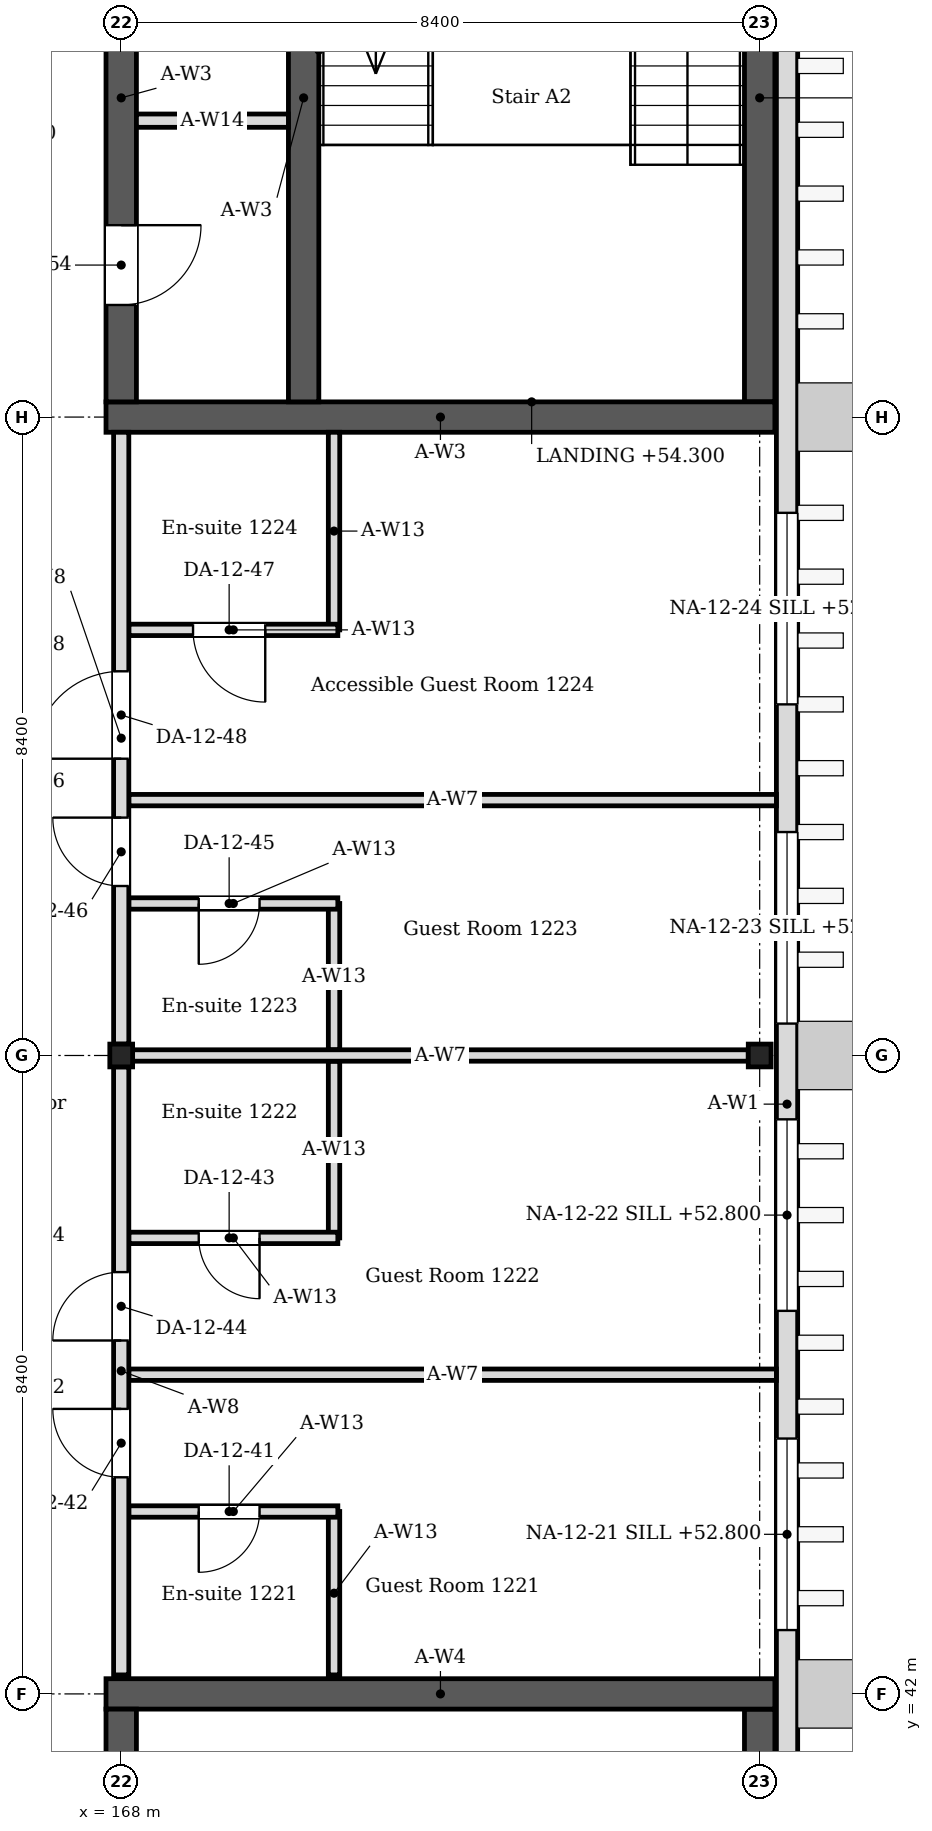
"""IFC4 building model, lengths in metres.
Left out: names, types, materials, properties, quantities, classifications, styles, units other than length and angle.
Written with IfcOpenShell. Run it as: python <this file> out.ifc"""

import sys

from ifc_helpers import new_model, si_unit, direction, frame, frame_2d, origin, origin_2d, place, context, subcontext, project, spatial, rectangle, i_section, extrude, element, fill, save


model = new_model("IFC4")
c1 = context("Model", 3, precision=1e-05, world=origin(), true_north=direction((0.0, 1.0)))
c2 = subcontext(c1, "Body", "Model", "MODEL_VIEW")
j1 = project(units=[si_unit("LENGTHUNIT", "METRE"), si_unit("PLANEANGLEUNIT", "RADIAN")], contexts=[c1])
p1 = place(None, origin())
s1 = spatial("IfcSite", under=j1, at=p1, CompositionType="ELEMENT")
p2 = place(p1, origin())
s2 = spatial("IfcBuilding", under=s1, at=p2, CompositionType="ELEMENT")
p3 = place(p2, frame((0.0, 0.0, 52.2)))
s3 = spatial("IfcBuildingStorey", under=s2, at=p3, CompositionType="ELEMENT", Elevation=52.2)
for number, where, z_axis, x_axis in (
    (1, (168.0, 50.4, 0.0), (0.0, 0.0, 1.0), (1.0, 0.0, 0.0)),
    (2, (176.4, 50.4, 0.0), (0.0, 0.0, 1.0), (1.0, 0.0, 0.0)),
):
    element("IfcColumn", number, at=place(p3, frame(where, z_axis=z_axis, x_axis=x_axis)), inside=s3, PredefinedType="COLUMN", context=c2, shape_type="SweptSolid", body=[
        extrude(i_section(OverallWidth=0.3, OverallDepth=0.3, WebThickness=0.01, FlangeThickness=0.015, FilletRadius=0.013, at=origin_2d()), origin(), (0.0, 0.0, 1.0), 4.2),
    ])
p4 = place(p3, frame((167.8, 58.8, 0.0), z_axis=(0.0, 0.0, 1.0), x_axis=(1.0, 0.0, 0.0)))
e3 = element("IfcWall", 3, at=p4, inside=s3, PredefinedType="SOLIDWALL", context=c2, shape_type="SweptSolid", body=[
    extrude(rectangle(XDim=8.8, YDim=0.4, at=frame_2d((4.4, 0.0))), origin(), (0.0, 0.0, 1.0), 4.05),
])
p5 = place(p3, frame((168.0, 59.0, 0.0), z_axis=(0.0, 0.0, 1.0), x_axis=(0.0, 1.0, 0.0)))
e4 = element("IfcWall", 4, at=p5, inside=s3, PredefinedType="SOLIDWALL", context=c2, shape_type="SweptSolid", body=[
    extrude(rectangle(XDim=8.0, YDim=0.4, at=frame_2d((4.0, 0.0))), origin(), (0.0, 0.0, 1.0), 4.05),
])
p6 = place(p5, frame((5.25, 0.0, 0.0)))
e5 = element("IfcOpeningElement", 5, at=p6, cuts=e4, PredefinedType="OPENING", context=c2, shape_type="SweptSolid", body=[
    extrude(rectangle(XDim=1.0, YDim=2.1, at=frame_2d((0.5, 1.05))), frame((0.0, 0.21, 0.0), z_axis=(0.0, -1.0, 0.0), x_axis=(1.0, 0.0, 0.0)), (0.0, 0.0, 1.0), 0.42),
])
p7 = place(p5, frame((1.275, 0.0, 0.0)))
e6 = element("IfcOpeningElement", 6, at=p7, cuts=e4, PredefinedType="OPENING", context=c2, shape_type="SweptSolid", body=[
    extrude(rectangle(XDim=1.05, YDim=2.1, at=frame_2d((0.525, 1.05))), frame((0.0, 0.21, 0.0), z_axis=(0.0, -1.0, 0.0), x_axis=(1.0, 0.0, 0.0)), (0.0, 0.0, 1.0), 0.42),
])
p8 = place(p3, frame((176.4, 59.0, 0.0), z_axis=(0.0, 0.0, 1.0), x_axis=(0.0, 1.0, 0.0)))
e7 = element("IfcWall", 7, at=p8, inside=s3, PredefinedType="SOLIDWALL", context=c2, shape_type="SweptSolid", body=[
    extrude(rectangle(XDim=8.0, YDim=0.4, at=frame_2d((4.0, 0.0))), origin(), (0.0, 0.0, 1.0), 4.05),
])
p9 = place(p3, frame((167.8, 42.0, 0.0), z_axis=(0.0, 0.0, 1.0), x_axis=(1.0, 0.0, 0.0)))
e8 = element("IfcWall", 8, at=p9, inside=s3, PredefinedType="SOLIDWALL", context=c2, shape_type="SweptSolid", body=[
    extrude(rectangle(XDim=8.8, YDim=0.4, at=frame_2d((4.4, 0.0))), origin(), (0.0, 0.0, 1.0), 4.05),
])
p10 = place(p3, frame((168.0, 25.4, 0.0), z_axis=(0.0, 0.0, 1.0), x_axis=(0.0, 1.0, 0.0)))
e9 = element("IfcWall", 9, at=p10, inside=s3, PredefinedType="SOLIDWALL", context=c2, shape_type="SweptSolid", body=[
    extrude(rectangle(XDim=16.4, YDim=0.4, at=frame_2d((8.2, 0.0))), origin(), (0.0, 0.0, 1.0), 4.05),
])
p11 = place(p10, frame((1.0, 0.0, 0.0)))
e10 = element("IfcOpeningElement", 10, at=p11, cuts=e9, PredefinedType="OPENING", context=c2, shape_type="SweptSolid", body=[
    extrude(rectangle(XDim=1.0, YDim=2.1, at=frame_2d((0.5, 1.05))), frame((0.0, 0.21, 0.0), z_axis=(0.0, -1.0, 0.0), x_axis=(1.0, 0.0, 0.0)), (0.0, 0.0, 1.0), 0.42),
])
p12 = place(p10, frame((14.4, 0.0, 0.0)))
e11 = element("IfcOpeningElement", 11, at=p12, cuts=e9, PredefinedType="OPENING", context=c2, shape_type="SweptSolid", body=[
    extrude(rectangle(XDim=1.4, YDim=2.1, at=frame_2d((0.7, 1.05))), frame((0.0, 0.21, 0.0), z_axis=(0.0, -1.0, 0.0), x_axis=(1.0, 0.0, 0.0)), (0.0, 0.0, 1.0), 0.42),
])
p13 = place(p3, frame((176.4, 25.4, 0.0), z_axis=(0.0, 0.0, 1.0), x_axis=(0.0, 1.0, 0.0)))
e12 = element("IfcWall", 12, at=p13, inside=s3, PredefinedType="SOLIDWALL", context=c2, shape_type="SweptSolid", body=[
    extrude(rectangle(XDim=16.4, YDim=0.4, at=frame_2d((8.2, 0.0))), origin(), (0.0, 0.0, 1.0), 4.05),
])
p14 = place(p3, frame((176.76, 24.85, 0.0), z_axis=(0.0, 0.0, 1.0), x_axis=(0.0, 1.0, 0.0)))
e13 = element("IfcWall", 13, at=p14, inside=s3, PredefinedType="SOLIDWALL", context=c2, shape_type="SweptSolid", body=[
    extrude(rectangle(XDim=42.57, YDim=0.28, at=frame_2d((21.285, 0.0))), origin(), (0.0, 0.0, 1.0), 4.05),
])
p15 = place(p14, frame((17.99, 0.0, 0.6)))
e14 = element("IfcOpeningElement", 14, at=p15, cuts=e13, PredefinedType="OPENING", context=c2, shape_type="SweptSolid", body=[
    extrude(rectangle(XDim=2.52, YDim=2.4, at=frame_2d((1.26, 1.2))), frame((0.0, 0.15, 0.0), z_axis=(0.0, -1.0, 0.0), x_axis=(1.0, 0.0, 0.0)), (0.0, 0.0, 1.0), 0.3),
])
p16 = place(p14, frame((22.19, 0.0, 0.6)))
e15 = element("IfcOpeningElement", 15, at=p16, cuts=e13, PredefinedType="OPENING", context=c2, shape_type="SweptSolid", body=[
    extrude(rectangle(XDim=2.52, YDim=2.4, at=frame_2d((1.26, 1.2))), frame((0.0, 0.15, 0.0), z_axis=(0.0, -1.0, 0.0), x_axis=(1.0, 0.0, 0.0)), (0.0, 0.0, 1.0), 0.3),
])
p17 = place(p14, frame((25.97, 0.0, 0.6)))
e16 = element("IfcOpeningElement", 16, at=p17, cuts=e13, PredefinedType="OPENING", context=c2, shape_type="SweptSolid", body=[
    extrude(rectangle(XDim=2.52, YDim=2.4, at=frame_2d((1.26, 1.2))), frame((0.0, 0.15, 0.0), z_axis=(0.0, -1.0, 0.0), x_axis=(1.0, 0.0, 0.0)), (0.0, 0.0, 1.0), 0.3),
])
p18 = place(p14, frame((30.17, 0.0, 0.45)))
e17 = element("IfcOpeningElement", 17, at=p18, cuts=e13, PredefinedType="OPENING", context=c2, shape_type="SweptSolid", body=[
    extrude(rectangle(XDim=2.52, YDim=2.1, at=frame_2d((1.26, 1.05))), frame((0.0, 0.15, 0.0), z_axis=(0.0, -1.0, 0.0), x_axis=(1.0, 0.0, 0.0)), (0.0, 0.0, 1.0), 0.3),
])
p19 = place(p3, frame((170.8, 42.25, 0.0), z_axis=(0.0, 0.0, 1.0), x_axis=(0.0, 1.0, 0.0)))
e18 = element("IfcWall", 18, at=p19, inside=s3, PredefinedType="PARTITIONING", context=c2, shape_type="SweptSolid", body=[
    extrude(rectangle(XDim=2.15, YDim=0.15, at=frame_2d((1.075, 0.0))), origin(), (0.0, 0.0, 1.0), 4.05),
])
p20 = place(p3, frame((170.85, 44.4, 0.0), z_axis=(0.0, 0.0, 1.0), x_axis=(-1.0, 0.0, 0.0)))
e19 = element("IfcWall", 19, at=p20, inside=s3, PredefinedType="PARTITIONING", context=c2, shape_type="SweptSolid", body=[
    extrude(rectangle(XDim=2.75, YDim=0.15, at=frame_2d((1.375, 0.0))), origin(), (0.0, 0.0, 1.0), 4.05),
])
p21 = place(p20, frame((1.03, 0.0, 0.0)))
e20 = element("IfcOpeningElement", 20, at=p21, cuts=e19, PredefinedType="OPENING", context=c2, shape_type="SweptSolid", body=[
    extrude(rectangle(XDim=0.8, YDim=2.1, at=frame_2d((0.4, 1.05))), frame((0.0, 0.085, 0.0), z_axis=(0.0, -1.0, 0.0), x_axis=(1.0, 0.0, 0.0)), (0.0, 0.0, 1.0), 0.17),
])
p22 = place(p3, frame((170.8, 48.0, 0.0), z_axis=(0.0, 0.0, 1.0), x_axis=(0.0, 1.0, 0.0)))
e21 = element("IfcWall", 21, at=p22, inside=s3, PredefinedType="PARTITIONING", context=c2, shape_type="SweptSolid", body=[
    extrude(rectangle(XDim=2.325, YDim=0.15, at=frame_2d((1.163, 0.0))), origin(), (0.0, 0.0, 1.0), 4.05),
])
p23 = place(p3, frame((170.85, 48.0, 0.0), z_axis=(0.0, 0.0, 1.0), x_axis=(-1.0, 0.0, 0.0)))
e22 = element("IfcWall", 22, at=p23, inside=s3, PredefinedType="PARTITIONING", context=c2, shape_type="SweptSolid", body=[
    extrude(rectangle(XDim=2.75, YDim=0.15, at=frame_2d((1.375, 0.0))), origin(), (0.0, 0.0, 1.0), 4.05),
])
p24 = place(p23, frame((1.03, 0.0, 0.0)))
e23 = element("IfcOpeningElement", 23, at=p24, cuts=e22, PredefinedType="OPENING", context=c2, shape_type="SweptSolid", body=[
    extrude(rectangle(XDim=0.8, YDim=2.1, at=frame_2d((0.4, 1.05))), frame((0.0, 0.085, 0.0), z_axis=(0.0, -1.0, 0.0), x_axis=(1.0, 0.0, 0.0)), (0.0, 0.0, 1.0), 0.17),
])
p25 = place(p3, frame((170.8, 50.475, 0.0), z_axis=(0.0, 0.0, 1.0), x_axis=(0.0, 1.0, 0.0)))
e24 = element("IfcWall", 24, at=p25, inside=s3, PredefinedType="PARTITIONING", context=c2, shape_type="SweptSolid", body=[
    extrude(rectangle(XDim=1.925, YDim=0.15, at=frame_2d((0.962, 0.0))), origin(), (0.0, 0.0, 1.0), 4.05),
])
p26 = place(p3, frame((170.85, 52.4, 0.0), z_axis=(0.0, 0.0, 1.0), x_axis=(-1.0, 0.0, 0.0)))
e25 = element("IfcWall", 25, at=p26, inside=s3, PredefinedType="PARTITIONING", context=c2, shape_type="SweptSolid", body=[
    extrude(rectangle(XDim=2.75, YDim=0.15, at=frame_2d((1.375, 0.0))), origin(), (0.0, 0.0, 1.0), 4.05),
])
p27 = place(p26, frame((1.03, 0.0, 0.0)))
e26 = element("IfcOpeningElement", 26, at=p27, cuts=e25, PredefinedType="OPENING", context=c2, shape_type="SweptSolid", body=[
    extrude(rectangle(XDim=0.8, YDim=2.1, at=frame_2d((0.4, 1.05))), frame((0.0, 0.085, 0.0), z_axis=(0.0, -1.0, 0.0), x_axis=(1.0, 0.0, 0.0)), (0.0, 0.0, 1.0), 0.17),
])
p28 = place(p3, frame((170.8, 56.0, 0.0), z_axis=(0.0, 0.0, 1.0), x_axis=(0.0, 1.0, 0.0)))
e27 = element("IfcWall", 27, at=p28, inside=s3, PredefinedType="PARTITIONING", context=c2, shape_type="SweptSolid", body=[
    extrude(rectangle(XDim=2.6, YDim=0.15, at=frame_2d((1.3, 0.0))), origin(), (0.0, 0.0, 1.0), 4.05),
])
p29 = place(p3, frame((170.85, 56.0, 0.0), z_axis=(0.0, 0.0, 1.0), x_axis=(-1.0, 0.0, 0.0)))
e28 = element("IfcWall", 28, at=p29, inside=s3, PredefinedType="PARTITIONING", context=c2, shape_type="SweptSolid", body=[
    extrude(rectangle(XDim=2.75, YDim=0.15, at=frame_2d((1.375, 0.0))), origin(), (0.0, 0.0, 1.0), 4.05),
])
p30 = place(p29, frame((0.955, 0.0, 0.0)))
e29 = element("IfcOpeningElement", 29, at=p30, cuts=e28, PredefinedType="OPENING", context=c2, shape_type="SweptSolid", body=[
    extrude(rectangle(XDim=0.95, YDim=2.1, at=frame_2d((0.475, 1.05))), frame((0.0, 0.085, 0.0), z_axis=(0.0, -1.0, 0.0), x_axis=(1.0, 0.0, 0.0)), (0.0, 0.0, 1.0), 0.17),
])
p31 = place(p3, frame((168.15, 50.4, 0.0), z_axis=(0.0, 0.0, 1.0), x_axis=(1.0, 0.0, 0.0)))
e30 = element("IfcWall", 30, at=p31, inside=s3, PredefinedType="PARTITIONING", context=c2, shape_type="SweptSolid", body=[
    extrude(rectangle(XDim=8.1, YDim=0.15, at=frame_2d((4.05, 0.0))), origin(), (0.0, 0.0, 1.0), 3.604),
])
for number, where, z_axis, x_axis in (
    (31, (168.1, 46.2, 0.0), (0.0, 0.0, 1.0), (1.0, 0.0, 0.0)),
    (32, (168.1, 53.76, 0.0), (0.0, 0.0, 1.0), (1.0, 0.0, 0.0)),
):
    element("IfcWall", number, at=place(p3, frame(where, z_axis=z_axis, x_axis=x_axis)), inside=s3, PredefinedType="PARTITIONING", context=c2, shape_type="SweptSolid", body=[
        extrude(rectangle(XDim=8.52, YDim=0.15, at=frame_2d((4.26, 0.0))), origin(), (0.0, 0.0, 1.0), 3.604),
    ])
p32 = place(p3, frame((168.0, 42.25, 0.0), z_axis=(0.0, 0.0, 1.0), x_axis=(0.0, 1.0, 0.0)))
e33 = element("IfcWall", 33, at=p32, inside=s3, PredefinedType="PARTITIONING", context=c2, shape_type="SweptSolid", body=[
    extrude(rectangle(XDim=8.0, YDim=0.2, at=frame_2d((4.0, 0.0))), origin(), (0.0, 0.0, 1.0), 3.45),
])
p33 = place(p32, frame((2.6, 0.0, 0.0)))
e34 = element("IfcOpeningElement", 34, at=p33, cuts=e33, PredefinedType="OPENING", context=c2, shape_type="SweptSolid", body=[
    extrude(rectangle(XDim=0.9, YDim=2.1, at=frame_2d((0.45, 1.05))), frame((0.0, 0.11, 0.0), z_axis=(0.0, -1.0, 0.0), x_axis=(1.0, 0.0, 0.0)), (0.0, 0.0, 1.0), 0.22),
])
p34 = place(p32, frame((4.4, 0.0, 0.0)))
e35 = element("IfcOpeningElement", 35, at=p34, cuts=e33, PredefinedType="OPENING", context=c2, shape_type="SweptSolid", body=[
    extrude(rectangle(XDim=0.9, YDim=2.1, at=frame_2d((0.45, 1.05))), frame((0.0, 0.11, 0.0), z_axis=(0.0, -1.0, 0.0), x_axis=(1.0, 0.0, 0.0)), (0.0, 0.0, 1.0), 0.22),
])
p35 = place(p3, frame((168.0, 50.55, 0.0), z_axis=(0.0, 0.0, 1.0), x_axis=(0.0, 1.0, 0.0)))
e36 = element("IfcWall", 36, at=p35, inside=s3, PredefinedType="PARTITIONING", context=c2, shape_type="SweptSolid", body=[
    extrude(rectangle(XDim=8.05, YDim=0.2, at=frame_2d((4.025, 0.0))), origin(), (0.0, 0.0, 1.0), 3.45),
])
p36 = place(p35, frame((2.08, 0.0, 0.0)))
e37 = element("IfcOpeningElement", 37, at=p36, cuts=e36, PredefinedType="OPENING", context=c2, shape_type="SweptSolid", body=[
    extrude(rectangle(XDim=0.9, YDim=2.1, at=frame_2d((0.45, 1.05))), frame((0.0, 0.11, 0.0), z_axis=(0.0, -1.0, 0.0), x_axis=(1.0, 0.0, 0.0)), (0.0, 0.0, 1.0), 0.22),
])
p37 = place(p35, frame((3.755, 0.0, 0.0)))
e38 = element("IfcOpeningElement", 38, at=p37, cuts=e36, PredefinedType="OPENING", context=c2, shape_type="SweptSolid", body=[
    extrude(rectangle(XDim=1.15, YDim=2.1, at=frame_2d((0.575, 1.05))), frame((0.0, 0.11, 0.0), z_axis=(0.0, -1.0, 0.0), x_axis=(1.0, 0.0, 0.0)), (0.0, 0.0, 1.0), 0.22),
])
p38 = place(p3, frame((170.4, 59.0, 0.0), z_axis=(0.0, 0.0, 1.0), x_axis=(0.0, 1.0, 0.0)))
e39 = element("IfcWall", 39, at=p38, inside=s3, PredefinedType="SOLIDWALL", context=c2, shape_type="SweptSolid", body=[
    extrude(rectangle(XDim=8.0, YDim=0.4, at=frame_2d((4.0, 0.0))), origin(), (0.0, 0.0, 1.0), 4.05),
])
p39 = place(p38, frame((6.8, 0.0, 0.0)))
e40 = element("IfcOpeningElement", 40, at=p39, cuts=e39, PredefinedType="OPENING", context=c2, shape_type="SweptSolid", body=[
    extrude(rectangle(XDim=0.9, YDim=2.1, at=frame_2d((0.45, 1.05))), frame((0.0, 0.21, 0.0), z_axis=(0.0, -1.0, 0.0), x_axis=(1.0, 0.0, 0.0)), (0.0, 0.0, 1.0), 0.42),
])
p40 = place(p3, frame((168.2, 62.7, 0.0), z_axis=(0.0, 0.0, 1.0), x_axis=(1.0, 0.0, 0.0)))
e41 = element("IfcWall", 41, at=p40, inside=s3, PredefinedType="PARTITIONING", context=c2, shape_type="SweptSolid", body=[
    extrude(rectangle(XDim=2.0, YDim=0.175, at=frame_2d((1.0, 0.0))), origin(), (0.0, 0.0, 1.0), 4.05),
])
p41 = place(p15, origin())
e42 = element("IfcWindow", 42, at=p41, inside=s3, PartitioningType="SINGLE_PANEL", PredefinedType="WINDOW", context=c2, shape_type="SweptSolid", body=[
    extrude(rectangle(XDim=2.52, YDim=2.4, at=frame_2d((1.26, 1.2))), frame((0.0, 0.03, 0.0), z_axis=(0.0, -1.0, 0.0), x_axis=(1.0, 0.0, 0.0)), (0.0, 0.0, 1.0), 0.06),
])
fill(e14, e42)
p42 = place(p16, origin())
e43 = element("IfcWindow", 43, at=p42, inside=s3, PartitioningType="SINGLE_PANEL", PredefinedType="WINDOW", context=c2, shape_type="SweptSolid", body=[
    extrude(rectangle(XDim=2.52, YDim=2.4, at=frame_2d((1.26, 1.2))), frame((0.0, 0.03, 0.0), z_axis=(0.0, -1.0, 0.0), x_axis=(1.0, 0.0, 0.0)), (0.0, 0.0, 1.0), 0.06),
])
fill(e15, e43)
p43 = place(p17, origin())
e44 = element("IfcWindow", 44, at=p43, inside=s3, PartitioningType="SINGLE_PANEL", PredefinedType="WINDOW", context=c2, shape_type="SweptSolid", body=[
    extrude(rectangle(XDim=2.52, YDim=2.4, at=frame_2d((1.26, 1.2))), frame((0.0, 0.03, 0.0), z_axis=(0.0, -1.0, 0.0), x_axis=(1.0, 0.0, 0.0)), (0.0, 0.0, 1.0), 0.06),
])
fill(e16, e44)
p44 = place(p18, origin())
e45 = element("IfcWindow", 45, at=p44, inside=s3, PartitioningType="SINGLE_PANEL", PredefinedType="WINDOW", context=c2, shape_type="SweptSolid", body=[
    extrude(rectangle(XDim=2.52, YDim=2.1, at=frame_2d((1.26, 1.05))), frame((0.0, 0.03, 0.0), z_axis=(0.0, -1.0, 0.0), x_axis=(1.0, 0.0, 0.0)), (0.0, 0.0, 1.0), 0.06),
])
fill(e17, e45)
p45 = place(p21, origin())
e46 = element("IfcDoor", 46, at=p45, inside=s3, OperationType="SINGLE_SWING_RIGHT", PredefinedType="DOOR", context=c2, shape_type="SweptSolid", body=[
    extrude(rectangle(XDim=0.8, YDim=2.1, at=frame_2d((0.4, 1.05))), frame((0.0, 0.025, 0.0), z_axis=(0.0, -1.0, 0.0), x_axis=(1.0, 0.0, 0.0)), (0.0, 0.0, 1.0), 0.05),
])
fill(e20, e46)
p46 = place(p33, origin())
e47 = element("IfcDoor", 47, at=p46, inside=s3, OperationType="SINGLE_SWING_RIGHT", PredefinedType="DOOR", context=c2, shape_type="SweptSolid", body=[
    extrude(rectangle(XDim=0.9, YDim=2.1, at=frame_2d((0.45, 1.05))), frame((0.0, 0.025, 0.0), z_axis=(0.0, -1.0, 0.0), x_axis=(1.0, 0.0, 0.0)), (0.0, 0.0, 1.0), 0.05),
])
fill(e34, e47)
p47 = place(p24, origin())
e48 = element("IfcDoor", 48, at=p47, inside=s3, OperationType="SINGLE_SWING_LEFT", PredefinedType="DOOR", context=c2, shape_type="SweptSolid", body=[
    extrude(rectangle(XDim=0.8, YDim=2.1, at=frame_2d((0.4, 1.05))), frame((0.0, 0.025, 0.0), z_axis=(0.0, -1.0, 0.0), x_axis=(1.0, 0.0, 0.0)), (0.0, 0.0, 1.0), 0.05),
])
fill(e23, e48)
p48 = place(p34, origin())
e49 = element("IfcDoor", 49, at=p48, inside=s3, OperationType="SINGLE_SWING_LEFT", PredefinedType="DOOR", context=c2, shape_type="SweptSolid", body=[
    extrude(rectangle(XDim=0.9, YDim=2.1, at=frame_2d((0.45, 1.05))), frame((0.0, 0.025, 0.0), z_axis=(0.0, -1.0, 0.0), x_axis=(1.0, 0.0, 0.0)), (0.0, 0.0, 1.0), 0.05),
])
fill(e35, e49)
p49 = place(p27, origin())
e50 = element("IfcDoor", 50, at=p49, inside=s3, OperationType="SINGLE_SWING_RIGHT", PredefinedType="DOOR", context=c2, shape_type="SweptSolid", body=[
    extrude(rectangle(XDim=0.8, YDim=2.1, at=frame_2d((0.4, 1.05))), frame((0.0, 0.025, 0.0), z_axis=(0.0, -1.0, 0.0), x_axis=(1.0, 0.0, 0.0)), (0.0, 0.0, 1.0), 0.05),
])
fill(e26, e50)
p50 = place(p36, origin())
e51 = element("IfcDoor", 51, at=p50, inside=s3, OperationType="SINGLE_SWING_RIGHT", PredefinedType="DOOR", context=c2, shape_type="SweptSolid", body=[
    extrude(rectangle(XDim=0.9, YDim=2.1, at=frame_2d((0.45, 1.05))), frame((0.0, 0.025, 0.0), z_axis=(0.0, -1.0, 0.0), x_axis=(1.0, 0.0, 0.0)), (0.0, 0.0, 1.0), 0.05),
])
fill(e37, e51)
p51 = place(p30, origin())
e52 = element("IfcDoor", 52, at=p51, inside=s3, OperationType="SINGLE_SWING_LEFT", PredefinedType="DOOR", context=c2, shape_type="SweptSolid", body=[
    extrude(rectangle(XDim=0.95, YDim=2.1, at=frame_2d((0.475, 1.05))), frame((0.0, 0.025, 0.0), z_axis=(0.0, -1.0, 0.0), x_axis=(1.0, 0.0, 0.0)), (0.0, 0.0, 1.0), 0.05),
])
fill(e29, e52)
p52 = place(p37, origin())
e53 = element("IfcDoor", 53, at=p52, inside=s3, OperationType="SINGLE_SWING_LEFT", PredefinedType="DOOR", context=c2, shape_type="SweptSolid", body=[
    extrude(rectangle(XDim=1.15, YDim=2.1, at=frame_2d((0.575, 1.05))), frame((0.0, 0.025, 0.0), z_axis=(0.0, -1.0, 0.0), x_axis=(1.0, 0.0, 0.0)), (0.0, 0.0, 1.0), 0.05),
])
fill(e38, e53)
p53 = place(p7, origin())
e54 = element("IfcDoor", 54, at=p53, inside=s3, OperationType="SINGLE_SWING_RIGHT", PredefinedType="DOOR", context=c2, shape_type="SweptSolid", body=[
    extrude(rectangle(XDim=1.05, YDim=2.1, at=frame_2d((0.525, 1.05))), frame((0.0, 0.025, 0.0), z_axis=(0.0, -1.0, 0.0), x_axis=(1.0, 0.0, 0.0)), (0.0, 0.0, 1.0), 0.05),
])
fill(e6, e54)
save(model, sys.argv[1])
